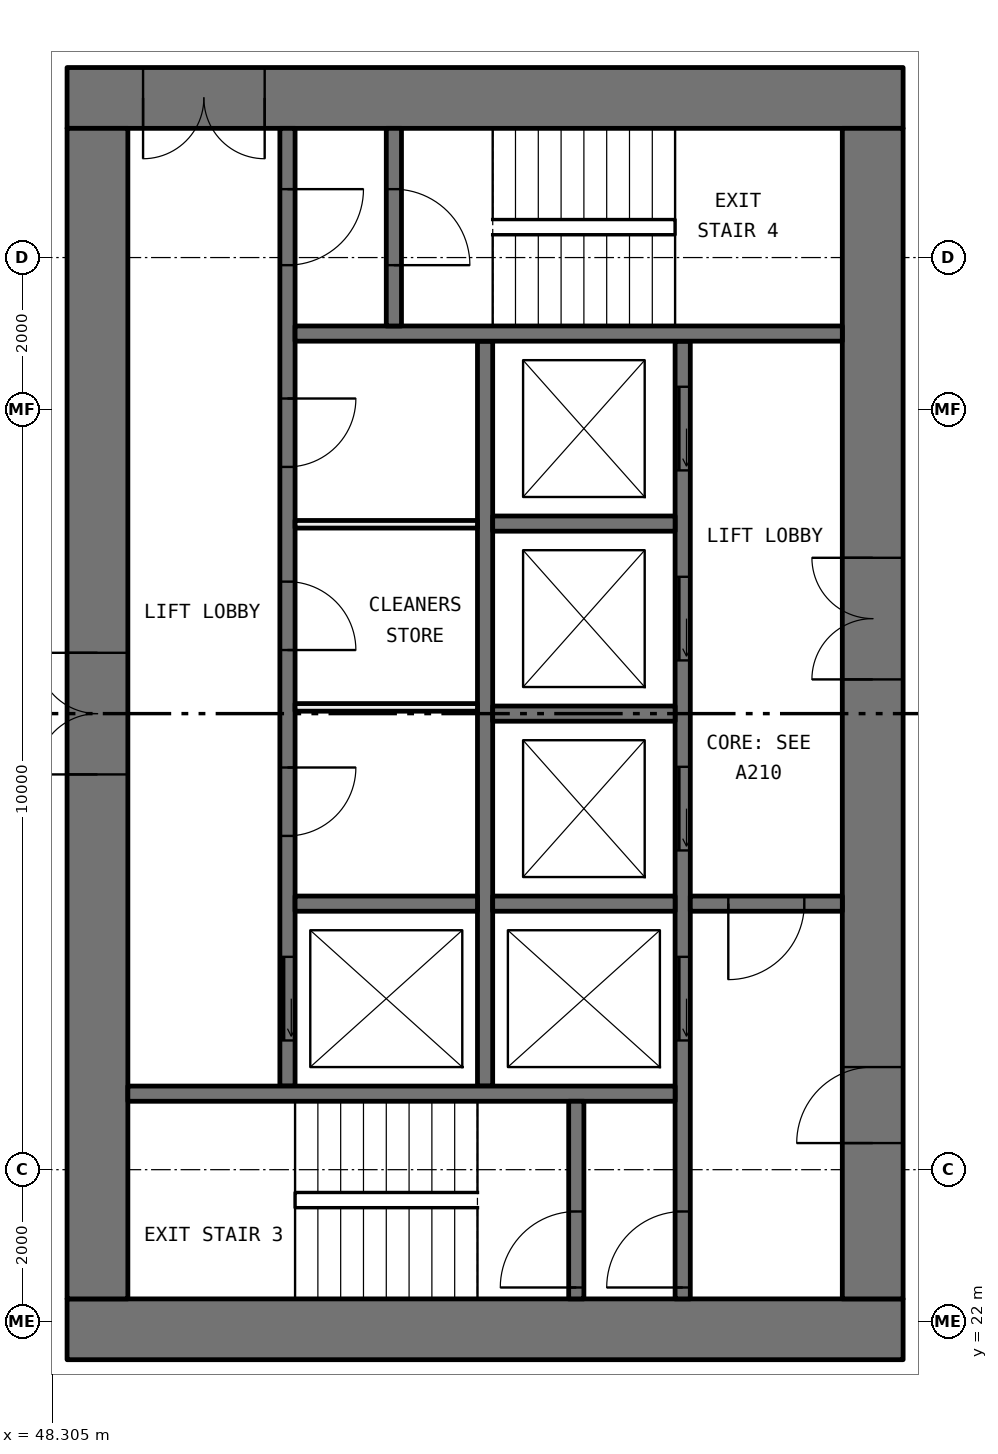
"""IFC4 building model, lengths in metres.
Left out: names, types, materials, properties, quantities, classifications, styles, units other than length and angle.
Written with IfcOpenShell. Run it as: python <this file> out.ifc"""

import sys

from ifc_helpers import new_model, si_unit, direction, frame, frame_2d, origin, place, context, subcontext, project, spatial, rectangle, extrude, element, fill, save


model = new_model("IFC4")
c1 = context("Model", 3, precision=1e-05, world=origin(), true_north=direction((0.0, 1.0)))
c2 = subcontext(c1, "Body", "Model", "MODEL_VIEW")
j1 = project(units=[si_unit("LENGTHUNIT", "METRE"), si_unit("PLANEANGLEUNIT", "RADIAN")], contexts=[c1])
p1 = place(None, origin())
s1 = spatial("IfcSite", under=j1, at=p1, CompositionType="ELEMENT")
p2 = place(p1, origin())
s2 = spatial("IfcBuilding", under=s1, at=p2, CompositionType="ELEMENT")
p3 = place(p2, frame((0.0, 0.0, 43.8)))
s3 = spatial("IfcBuildingStorey", under=s2, at=p3, CompositionType="ELEMENT", Elevation=43.8)
p4 = place(p3, frame((59.5, 21.9, 0.0), z_axis=(0.0, 0.0, 1.0), x_axis=(-1.0, 0.0, 0.0)))
e1 = element("IfcWall", 1, at=p4, inside=s3, PredefinedType="SHEAR", context=c2, shape_type="SweptSolid", body=[
    extrude(rectangle(XDim=11.0, YDim=0.8, at=frame_2d((5.5, 0.0))), origin(), (0.0, 0.0, 1.0), 3.05),
])
p5 = place(p3, frame((59.5, 38.1, 0.0), z_axis=(0.0, 0.0, 1.0), x_axis=(-1.0, 0.0, 0.0)))
e2 = element("IfcWall", 2, at=p5, inside=s3, PredefinedType="SHEAR", context=c2, shape_type="SweptSolid", body=[
    extrude(rectangle(XDim=11.0, YDim=0.8, at=frame_2d((5.5, 0.0))), origin(), (0.0, 0.0, 1.0), 3.05),
])
p6 = place(p5, frame((8.4, 0.0, 0.0)))
e3 = element("IfcOpeningElement", 3, at=p6, cuts=e2, PredefinedType="OPENING", context=c2, shape_type="SweptSolid", body=[
    extrude(rectangle(XDim=1.6, YDim=2.1, at=frame_2d((0.8, 1.05))), frame((0.0, 0.41, 0.0), z_axis=(0.0, -1.0, 0.0), x_axis=(1.0, 0.0, 0.0)), (0.0, 0.0, 1.0), 0.82),
])
p7 = place(p3, frame((59.1, 22.3, 0.0), z_axis=(0.0, 0.0, 1.0), x_axis=(0.0, 1.0, 0.0)))
e4 = element("IfcWall", 4, at=p7, inside=s3, PredefinedType="SHEAR", context=c2, shape_type="SweptSolid", body=[
    extrude(rectangle(XDim=15.4, YDim=0.8, at=frame_2d((7.7, 0.0))), origin(), (0.0, 0.0, 1.0), 3.05),
])
p8 = place(p7, frame((8.15, 0.0, 0.0)))
e5 = element("IfcOpeningElement", 5, at=p8, cuts=e4, PredefinedType="OPENING", context=c2, shape_type="SweptSolid", body=[
    extrude(rectangle(XDim=1.6, YDim=2.1, at=frame_2d((0.8, 1.05))), frame((0.0, 0.41, 0.0), z_axis=(0.0, -1.0, 0.0), x_axis=(1.0, 0.0, 0.0)), (0.0, 0.0, 1.0), 0.82),
])
p9 = place(p7, frame((2.05, 0.0, 0.0)))
e6 = element("IfcOpeningElement", 6, at=p9, cuts=e4, PredefinedType="OPENING", context=c2, shape_type="SweptSolid", body=[
    extrude(rectangle(XDim=1.0, YDim=2.1, at=frame_2d((0.5, 1.05))), frame((0.0, 0.41, 0.0), z_axis=(0.0, -1.0, 0.0), x_axis=(1.0, 0.0, 0.0)), (0.0, 0.0, 1.0), 0.82),
])
p10 = place(p3, frame((48.9, 22.3, 0.0), z_axis=(0.0, 0.0, 1.0), x_axis=(0.0, 1.0, 0.0)))
e7 = element("IfcWall", 7, at=p10, inside=s3, PredefinedType="SHEAR", context=c2, shape_type="SweptSolid", body=[
    extrude(rectangle(XDim=15.4, YDim=0.8, at=frame_2d((7.7, 0.0))), origin(), (0.0, 0.0, 1.0), 3.05),
])
p11 = place(p10, frame((6.9, 0.0, 0.0)))
e8 = element("IfcOpeningElement", 8, at=p11, cuts=e7, PredefinedType="OPENING", context=c2, shape_type="SweptSolid", body=[
    extrude(rectangle(XDim=1.6, YDim=2.1, at=frame_2d((0.8, 1.05))), frame((0.0, 0.41, 0.0), z_axis=(0.0, -1.0, 0.0), x_axis=(1.0, 0.0, 0.0)), (0.0, 0.0, 1.0), 0.82),
])
p12 = place(p3, frame((56.6, 22.3, 0.0), z_axis=(0.0, 0.0, 1.0), x_axis=(0.0, 1.0, 0.0)))
e9 = element("IfcWall", 9, at=p12, inside=s3, PredefinedType="SOLIDWALL", context=c2, shape_type="SweptSolid", body=[
    extrude(rectangle(XDim=12.6, YDim=0.2, at=frame_2d((6.3, 0.0))), origin(), (0.0, 0.0, 1.0), 3.05),
])
p13 = place(p12, frame((3.4, 0.0, 0.0)))
e10 = element("IfcOpeningElement", 10, at=p13, cuts=e9, PredefinedType="OPENING", context=c2, shape_type="SweptSolid", body=[
    extrude(rectangle(XDim=1.1, YDim=2.1, at=frame_2d((0.55, 1.05))), frame((0.0, 0.11, 0.0), z_axis=(0.0, -1.0, 0.0), x_axis=(1.0, 0.0, 0.0)), (0.0, 0.0, 1.0), 0.22),
])
p14 = place(p12, frame((5.9, 0.0, 0.0)))
e11 = element("IfcOpeningElement", 11, at=p14, cuts=e9, PredefinedType="OPENING", context=c2, shape_type="SweptSolid", body=[
    extrude(rectangle(XDim=1.1, YDim=2.1, at=frame_2d((0.55, 1.05))), frame((0.0, 0.11, 0.0), z_axis=(0.0, -1.0, 0.0), x_axis=(1.0, 0.0, 0.0)), (0.0, 0.0, 1.0), 0.22),
])
p15 = place(p12, frame((8.4, 0.0, 0.0)))
e12 = element("IfcOpeningElement", 12, at=p15, cuts=e9, PredefinedType="OPENING", context=c2, shape_type="SweptSolid", body=[
    extrude(rectangle(XDim=1.1, YDim=2.1, at=frame_2d((0.55, 1.05))), frame((0.0, 0.11, 0.0), z_axis=(0.0, -1.0, 0.0), x_axis=(1.0, 0.0, 0.0)), (0.0, 0.0, 1.0), 0.22),
])
p16 = place(p12, frame((10.9, 0.0, 0.0)))
e13 = element("IfcOpeningElement", 13, at=p16, cuts=e9, PredefinedType="OPENING", context=c2, shape_type="SweptSolid", body=[
    extrude(rectangle(XDim=1.1, YDim=2.1, at=frame_2d((0.55, 1.05))), frame((0.0, 0.11, 0.0), z_axis=(0.0, -1.0, 0.0), x_axis=(1.0, 0.0, 0.0)), (0.0, 0.0, 1.0), 0.22),
])
p17 = place(p12, frame((0.15, 0.0, 0.0)))
e14 = element("IfcOpeningElement", 14, at=p17, cuts=e9, PredefinedType="OPENING", context=c2, shape_type="SweptSolid", body=[
    extrude(rectangle(XDim=1.0, YDim=2.1, at=frame_2d((0.5, 1.05))), frame((0.0, 0.11, 0.0), z_axis=(0.0, -1.0, 0.0), x_axis=(1.0, 0.0, 0.0)), (0.0, 0.0, 1.0), 0.22),
])
p18 = place(p3, frame((51.4, 25.1, 0.0), z_axis=(0.0, 0.0, 1.0), x_axis=(0.0, 1.0, 0.0)))
e15 = element("IfcWall", 15, at=p18, inside=s3, PredefinedType="SOLIDWALL", context=c2, shape_type="SweptSolid", body=[
    extrude(rectangle(XDim=12.6, YDim=0.2, at=frame_2d((6.3, 0.0))), origin(), (0.0, 0.0, 1.0), 3.05),
])
p19 = place(p18, frame((0.6, 0.0, 0.0)))
e16 = element("IfcOpeningElement", 16, at=p19, cuts=e15, PredefinedType="OPENING", context=c2, shape_type="SweptSolid", body=[
    extrude(rectangle(XDim=1.1, YDim=2.1, at=frame_2d((0.55, 1.05))), frame((0.0, 0.11, 0.0), z_axis=(0.0, -1.0, 0.0), x_axis=(1.0, 0.0, 0.0)), (0.0, 0.0, 1.0), 0.22),
])
p20 = place(p18, frame((10.8, 0.0, 0.0)))
e17 = element("IfcOpeningElement", 17, at=p20, cuts=e15, PredefinedType="OPENING", context=c2, shape_type="SweptSolid", body=[
    extrude(rectangle(XDim=1.0, YDim=2.1, at=frame_2d((0.5, 1.05))), frame((0.0, 0.11, 0.0), z_axis=(0.0, -1.0, 0.0), x_axis=(1.0, 0.0, 0.0)), (0.0, 0.0, 1.0), 0.22),
])
p21 = place(p18, frame((3.291, 0.0, 0.0)))
e18 = element("IfcOpeningElement", 18, at=p21, cuts=e15, PredefinedType="OPENING", context=c2, shape_type="SweptSolid", body=[
    extrude(rectangle(XDim=0.9, YDim=2.1, at=frame_2d((0.45, 1.05))), frame((0.0, 0.11, 0.0), z_axis=(0.0, -1.0, 0.0), x_axis=(1.0, 0.0, 0.0)), (0.0, 0.0, 1.0), 0.22),
])
p22 = place(p18, frame((5.737, 0.0, 0.0)))
e19 = element("IfcOpeningElement", 19, at=p22, cuts=e15, PredefinedType="OPENING", context=c2, shape_type="SweptSolid", body=[
    extrude(rectangle(XDim=0.9, YDim=2.1, at=frame_2d((0.45, 1.05))), frame((0.0, 0.11, 0.0), z_axis=(0.0, -1.0, 0.0), x_axis=(1.0, 0.0, 0.0)), (0.0, 0.0, 1.0), 0.22),
])
p23 = place(p18, frame((8.146, 0.0, 0.0)))
e20 = element("IfcOpeningElement", 20, at=p23, cuts=e15, PredefinedType="OPENING", context=c2, shape_type="SweptSolid", body=[
    extrude(rectangle(XDim=0.9, YDim=2.1, at=frame_2d((0.45, 1.05))), frame((0.0, 0.11, 0.0), z_axis=(0.0, -1.0, 0.0), x_axis=(1.0, 0.0, 0.0)), (0.0, 0.0, 1.0), 0.22),
])
p24 = place(p3, frame((54.0, 25.1, 0.0), z_axis=(0.0, 0.0, 1.0), x_axis=(0.0, 1.0, 0.0)))
e21 = element("IfcWall", 21, at=p24, inside=s3, PredefinedType="SOLIDWALL", context=c2, shape_type="SweptSolid", body=[
    extrude(rectangle(XDim=9.8, YDim=0.2, at=frame_2d((4.9, 0.0))), origin(), (0.0, 0.0, 1.0), 3.05),
])
for number, where, z_axis, x_axis in (
    (22, (56.5, 25.0, 0.0), (0.0, 0.0, 1.0), (-1.0, 0.0, 0.0)),
    (23, (58.7, 35.0, 0.0), (0.0, 0.0, 1.0), (-1.0, 0.0, 0.0)),
):
    element("IfcWall", number, at=place(p3, frame(where, z_axis=z_axis, x_axis=x_axis)), inside=s3, PredefinedType="SOLIDWALL", context=c2, shape_type="SweptSolid", body=[
        extrude(rectangle(XDim=7.2, YDim=0.2, at=frame_2d((3.6, 0.0))), origin(), (0.0, 0.0, 1.0), 3.05),
    ])
p25 = place(p3, frame((58.7, 27.5, 0.0), z_axis=(0.0, 0.0, 1.0), x_axis=(-1.0, 0.0, 0.0)))
e24 = element("IfcWall", 24, at=p25, inside=s3, PredefinedType="SOLIDWALL", context=c2, shape_type="SweptSolid", body=[
    extrude(rectangle(XDim=2.0, YDim=0.2, at=frame_2d((1.0, 0.0))), origin(), (0.0, 0.0, 1.0), 3.05),
])
p26 = place(p25, frame((0.5, 0.0, 0.0)))
e25 = element("IfcOpeningElement", 25, at=p26, cuts=e24, PredefinedType="OPENING", context=c2, shape_type="SweptSolid", body=[
    extrude(rectangle(XDim=1.0, YDim=2.1, at=frame_2d((0.5, 1.05))), frame((0.0, 0.11, 0.0), z_axis=(0.0, -1.0, 0.0), x_axis=(1.0, 0.0, 0.0)), (0.0, 0.0, 1.0), 0.22),
])
p27 = place(p3, frame((55.2, 22.3, 0.0), z_axis=(0.0, 0.0, 1.0), x_axis=(0.0, 1.0, 0.0)))
e26 = element("IfcWall", 26, at=p27, inside=s3, PredefinedType="SOLIDWALL", context=c2, shape_type="SweptSolid", body=[
    extrude(rectangle(XDim=2.6, YDim=0.2, at=frame_2d((1.3, 0.0))), origin(), (0.0, 0.0, 1.0), 3.05),
])
p28 = place(p27, frame((0.15, 0.0, 0.0)))
e27 = element("IfcOpeningElement", 27, at=p28, cuts=e26, PredefinedType="OPENING", context=c2, shape_type="SweptSolid", body=[
    extrude(rectangle(XDim=1.0, YDim=2.1, at=frame_2d((0.5, 1.05))), frame((0.0, 0.11, 0.0), z_axis=(0.0, -1.0, 0.0), x_axis=(1.0, 0.0, 0.0)), (0.0, 0.0, 1.0), 0.22),
])
p29 = place(p3, frame((52.8, 35.1, 0.0), z_axis=(0.0, 0.0, 1.0), x_axis=(0.0, 1.0, 0.0)))
e28 = element("IfcWall", 28, at=p29, inside=s3, PredefinedType="SOLIDWALL", context=c2, shape_type="SweptSolid", body=[
    extrude(rectangle(XDim=2.6, YDim=0.2, at=frame_2d((1.3, 0.0))), origin(), (0.0, 0.0, 1.0), 3.05),
])
p30 = place(p29, frame((0.8, 0.0, 0.0)))
e29 = element("IfcOpeningElement", 29, at=p30, cuts=e28, PredefinedType="OPENING", context=c2, shape_type="SweptSolid", body=[
    extrude(rectangle(XDim=1.0, YDim=2.1, at=frame_2d((0.5, 1.05))), frame((0.0, 0.11, 0.0), z_axis=(0.0, -1.0, 0.0), x_axis=(1.0, 0.0, 0.0)), (0.0, 0.0, 1.0), 0.22),
])
for number, where, z_axis, x_axis in (
    (30, (56.5, 27.5, 0.0), (0.0, 0.0, 1.0), (-1.0, 0.0, 0.0)),
    (31, (56.5, 30.0, 0.0), (0.0, 0.0, 1.0), (-1.0, 0.0, 0.0)),
    (32, (56.5, 32.5, 0.0), (0.0, 0.0, 1.0), (-1.0, 0.0, 0.0)),
    (33, (53.9, 27.5, 0.0), (0.0, 0.0, 1.0), (-1.0, 0.0, 0.0)),
):
    element("IfcWall", number, at=place(p3, frame(where, z_axis=z_axis, x_axis=x_axis)), inside=s3, PredefinedType="SOLIDWALL", context=c2, shape_type="SweptSolid", body=[
        extrude(rectangle(XDim=2.4, YDim=0.2, at=frame_2d((1.2, 0.0))), origin(), (0.0, 0.0, 1.0), 3.05),
    ])
for number, where, z_axis, x_axis in (
    (34, (53.9, 30.082, 0.0), (0.0, 0.0, 1.0), (-1.0, 0.0, 0.0)),
    (35, (53.9, 32.491, 0.0), (0.0, 0.0, 1.0), (-1.0, 0.0, 0.0)),
):
    element("IfcWall", number, at=place(p3, frame(where, z_axis=z_axis, x_axis=x_axis)), inside=s3, PredefinedType="PARTITIONING", context=c2, shape_type="SweptSolid", body=[
        extrude(rectangle(XDim=2.4, YDim=0.1, at=frame_2d((1.2, 0.0))), origin(), (0.0, 0.0, 1.0), 3.05),
    ])
p31 = place(p19, origin())
e36 = element("IfcDoor", 36, at=p31, inside=s3, OperationType="SLIDING_TO_LEFT", PredefinedType="DOOR", context=c2, shape_type="SweptSolid", body=[
    extrude(rectangle(XDim=1.1, YDim=2.1, at=frame_2d((0.55, 1.05))), frame((0.0, 0.025, 0.0), z_axis=(0.0, -1.0, 0.0), x_axis=(1.0, 0.0, 0.0)), (0.0, 0.0, 1.0), 0.05),
])
fill(e16, e36)
p32 = place(p13, origin())
e37 = element("IfcDoor", 37, at=p32, inside=s3, OperationType="SLIDING_TO_LEFT", PredefinedType="DOOR", context=c2, shape_type="SweptSolid", body=[
    extrude(rectangle(XDim=1.1, YDim=2.1, at=frame_2d((0.55, 1.05))), frame((0.0, 0.025, 0.0), z_axis=(0.0, -1.0, 0.0), x_axis=(1.0, 0.0, 0.0)), (0.0, 0.0, 1.0), 0.05),
])
fill(e10, e37)
p33 = place(p14, origin())
e38 = element("IfcDoor", 38, at=p33, inside=s3, OperationType="SLIDING_TO_LEFT", PredefinedType="DOOR", context=c2, shape_type="SweptSolid", body=[
    extrude(rectangle(XDim=1.1, YDim=2.1, at=frame_2d((0.55, 1.05))), frame((0.0, 0.025, 0.0), z_axis=(0.0, -1.0, 0.0), x_axis=(1.0, 0.0, 0.0)), (0.0, 0.0, 1.0), 0.05),
])
fill(e11, e38)
p34 = place(p15, origin())
e39 = element("IfcDoor", 39, at=p34, inside=s3, OperationType="SLIDING_TO_LEFT", PredefinedType="DOOR", context=c2, shape_type="SweptSolid", body=[
    extrude(rectangle(XDim=1.1, YDim=2.1, at=frame_2d((0.55, 1.05))), frame((0.0, 0.025, 0.0), z_axis=(0.0, -1.0, 0.0), x_axis=(1.0, 0.0, 0.0)), (0.0, 0.0, 1.0), 0.05),
])
fill(e12, e39)
p35 = place(p16, origin())
e40 = element("IfcDoor", 40, at=p35, inside=s3, OperationType="SLIDING_TO_LEFT", PredefinedType="DOOR", context=c2, shape_type="SweptSolid", body=[
    extrude(rectangle(XDim=1.1, YDim=2.1, at=frame_2d((0.55, 1.05))), frame((0.0, 0.025, 0.0), z_axis=(0.0, -1.0, 0.0), x_axis=(1.0, 0.0, 0.0)), (0.0, 0.0, 1.0), 0.05),
])
fill(e13, e40)
p36 = place(p28, origin())
e41 = element("IfcDoor", 41, at=p36, inside=s3, OperationType="SINGLE_SWING_RIGHT", PredefinedType="DOOR", context=c2, shape_type="SweptSolid", body=[
    extrude(rectangle(XDim=1.0, YDim=2.1, at=frame_2d((0.5, 1.05))), frame((0.0, 0.025, 0.0), z_axis=(0.0, -1.0, 0.0), x_axis=(1.0, 0.0, 0.0)), (0.0, 0.0, 1.0), 0.05),
])
fill(e27, e41)
p37 = place(p17, origin())
e42 = element("IfcDoor", 42, at=p37, inside=s3, OperationType="SINGLE_SWING_RIGHT", PredefinedType="DOOR", context=c2, shape_type="SweptSolid", body=[
    extrude(rectangle(XDim=1.0, YDim=2.1, at=frame_2d((0.5, 1.05))), frame((0.0, 0.025, 0.0), z_axis=(0.0, -1.0, 0.0), x_axis=(1.0, 0.0, 0.0)), (0.0, 0.0, 1.0), 0.05),
])
fill(e14, e42)
p38 = place(p20, frame((1.0, 0.0, 0.0), x_axis=(-1.0, 0.0, 0.0)))
e43 = element("IfcDoor", 43, at=p38, inside=s3, OperationType="SINGLE_SWING_RIGHT", PredefinedType="DOOR", context=c2, shape_type="SweptSolid", body=[
    extrude(rectangle(XDim=1.0, YDim=2.1, at=frame_2d((0.5, 1.05))), frame((0.0, 0.025, 0.0), z_axis=(0.0, -1.0, 0.0), x_axis=(1.0, 0.0, 0.0)), (0.0, 0.0, 1.0), 0.05),
])
fill(e17, e43)
p39 = place(p30, frame((1.0, 0.0, 0.0), x_axis=(-1.0, 0.0, 0.0)))
e44 = element("IfcDoor", 44, at=p39, inside=s3, OperationType="SINGLE_SWING_LEFT", PredefinedType="DOOR", context=c2, shape_type="SweptSolid", body=[
    extrude(rectangle(XDim=1.0, YDim=2.1, at=frame_2d((0.5, 1.05))), frame((0.0, 0.025, 0.0), z_axis=(0.0, -1.0, 0.0), x_axis=(1.0, 0.0, 0.0)), (0.0, 0.0, 1.0), 0.05),
])
fill(e29, e44)
p40 = place(p26, origin())
e45 = element("IfcDoor", 45, at=p40, inside=s3, OperationType="SINGLE_SWING_LEFT", PredefinedType="DOOR", context=c2, shape_type="SweptSolid", body=[
    extrude(rectangle(XDim=1.0, YDim=2.1, at=frame_2d((0.5, 1.05))), frame((0.0, 0.025, 0.0), z_axis=(0.0, -1.0, 0.0), x_axis=(1.0, 0.0, 0.0)), (0.0, 0.0, 1.0), 0.05),
])
fill(e25, e45)
p41 = place(p8, origin())
e46 = element("IfcDoor", 46, at=p41, inside=s3, OperationType="DOUBLE_DOOR_SINGLE_SWING", PredefinedType="DOOR", context=c2, shape_type="SweptSolid", body=[
    extrude(rectangle(XDim=1.6, YDim=2.1, at=frame_2d((0.8, 1.05))), frame((0.0, 0.025, 0.0), z_axis=(0.0, -1.0, 0.0), x_axis=(1.0, 0.0, 0.0)), (0.0, 0.0, 1.0), 0.05),
])
fill(e5, e46)
p42 = place(p9, origin())
e47 = element("IfcDoor", 47, at=p42, inside=s3, OperationType="SINGLE_SWING_RIGHT", PredefinedType="DOOR", context=c2, shape_type="SweptSolid", body=[
    extrude(rectangle(XDim=1.0, YDim=2.1, at=frame_2d((0.5, 1.05))), frame((0.0, 0.025, 0.0), z_axis=(0.0, -1.0, 0.0), x_axis=(1.0, 0.0, 0.0)), (0.0, 0.0, 1.0), 0.05),
])
fill(e6, e47)
p43 = place(p6, origin())
e48 = element("IfcDoor", 48, at=p43, inside=s3, OperationType="DOUBLE_DOOR_SINGLE_SWING", PredefinedType="DOOR", context=c2, shape_type="SweptSolid", body=[
    extrude(rectangle(XDim=1.6, YDim=2.1, at=frame_2d((0.8, 1.05))), frame((0.0, 0.025, 0.0), z_axis=(0.0, -1.0, 0.0), x_axis=(1.0, 0.0, 0.0)), (0.0, 0.0, 1.0), 0.05),
])
fill(e3, e48)
p44 = place(p11, origin())
e49 = element("IfcDoor", 49, at=p44, inside=s3, OperationType="DOUBLE_DOOR_SINGLE_SWING", PredefinedType="DOOR", context=c2, shape_type="SweptSolid", body=[
    extrude(rectangle(XDim=1.6, YDim=2.1, at=frame_2d((0.8, 1.05))), frame((0.0, 0.025, 0.0), z_axis=(0.0, -1.0, 0.0), x_axis=(1.0, 0.0, 0.0)), (0.0, 0.0, 1.0), 0.05),
])
fill(e8, e49)
p45 = place(p21, frame((0.9, 0.0, 0.0), x_axis=(-1.0, 0.0, 0.0)))
e50 = element("IfcDoor", 50, at=p45, inside=s3, OperationType="SINGLE_SWING_RIGHT", PredefinedType="DOOR", context=c2, shape_type="SweptSolid", body=[
    extrude(rectangle(XDim=0.9, YDim=2.1, at=frame_2d((0.45, 1.05))), frame((0.0, 0.025, 0.0), z_axis=(0.0, -1.0, 0.0), x_axis=(1.0, 0.0, 0.0)), (0.0, 0.0, 1.0), 0.05),
])
fill(e18, e50)
p46 = place(p22, frame((0.9, 0.0, 0.0), x_axis=(-1.0, 0.0, 0.0)))
e51 = element("IfcDoor", 51, at=p46, inside=s3, OperationType="SINGLE_SWING_LEFT", PredefinedType="DOOR", context=c2, shape_type="SweptSolid", body=[
    extrude(rectangle(XDim=0.9, YDim=2.1, at=frame_2d((0.45, 1.05))), frame((0.0, 0.025, 0.0), z_axis=(0.0, -1.0, 0.0), x_axis=(1.0, 0.0, 0.0)), (0.0, 0.0, 1.0), 0.05),
])
fill(e19, e51)
p47 = place(p23, frame((0.9, 0.0, 0.0), x_axis=(-1.0, 0.0, 0.0)))
e52 = element("IfcDoor", 52, at=p47, inside=s3, OperationType="SINGLE_SWING_RIGHT", PredefinedType="DOOR", context=c2, shape_type="SweptSolid", body=[
    extrude(rectangle(XDim=0.9, YDim=2.1, at=frame_2d((0.45, 1.05))), frame((0.0, 0.025, 0.0), z_axis=(0.0, -1.0, 0.0), x_axis=(1.0, 0.0, 0.0)), (0.0, 0.0, 1.0), 0.05),
])
fill(e20, e52)
save(model, sys.argv[1])
